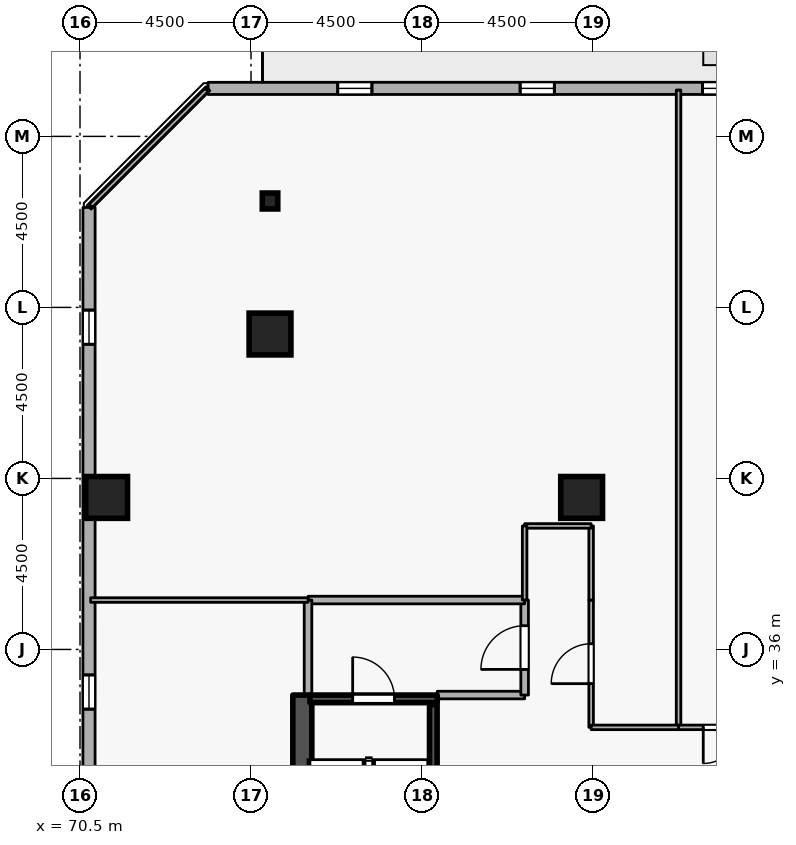
"""IFC4 building model, lengths in metres.
Left out: names, types, materials, properties, quantities, classifications, styles, units other than length and angle.
Written with IfcOpenShell. Run it as: python <this file> out.ifc"""

import sys

from ifc_helpers import new_model, si_unit, direction, frame, frame_2d, origin, origin_2d, place, context, subcontext, project, spatial, rectangle, i_section, extrude, element, fill, save


model = new_model("IFC4")
c1 = context("Model", 3, precision=1e-05, world=origin(), true_north=direction((0.0, 1.0)))
c2 = subcontext(c1, "Body", "Model", "MODEL_VIEW")
j1 = project(units=[si_unit("LENGTHUNIT", "METRE"), si_unit("PLANEANGLEUNIT", "RADIAN")], contexts=[c1])
p1 = place(None, origin())
s1 = spatial("IfcSite", under=j1, at=p1, CompositionType="ELEMENT")
p2 = place(p1, origin())
s2 = spatial("IfcBuilding", under=s1, at=p2, CompositionType="ELEMENT")
p3 = place(p2, frame((0.0, 0.0, 163.5)))
s3 = spatial("IfcBuildingStorey", under=s2, at=p3, CompositionType="ELEMENT", Elevation=163.5)
p4 = place(p3, frame((76.35, 19.2, 0.0), z_axis=(0.0, 0.0, 1.0), x_axis=(0.0, 1.0, 0.0)))
e1 = element("IfcWall", 1, at=p4, inside=s3, PredefinedType="SHEAR", context=c2, shape_type="SweptSolid", body=[
    extrude(rectangle(XDim=15.6, YDim=0.5, at=frame_2d((7.8, 0.0))), origin(), (0.0, 0.0, 1.0), 3.6),
])
for number, where, z_axis, x_axis in (
    (2, (75.5, 44.3, 0.0), (0.0, 0.0, 1.0), (1.0, 0.0, 0.0)),
    (3, (71.2, 40.0, 0.0), (0.0, 0.0, 1.0), (1.0, 0.0, 0.0)),
    (4, (83.7, 40.0, 0.0), (0.0, 0.0, 1.0), (1.0, 0.0, 0.0)),
):
    element("IfcColumn", number, at=place(p3, frame(where, z_axis=z_axis, x_axis=x_axis)), inside=s3, PredefinedType="COLUMN", context=c2, shape_type="SweptSolid", body=[
        extrude(rectangle(XDim=1.1, YDim=1.1, at=origin_2d()), origin(), (0.0, 0.0, 1.0), 3.6),
    ])
p5 = place(p3, frame((75.5, 47.8, 0.0), z_axis=(0.0, 0.0, 1.0), x_axis=(1.0, 0.0, 0.0)))
e5 = element("IfcColumn", 5, at=p5, inside=s3, PredefinedType="COLUMN", context=c2, shape_type="SweptSolid", body=[
    extrude(i_section(OverallWidth=0.407, OverallDepth=0.419, WebThickness=0.031, FlangeThickness=0.049, FilletRadius=0.015, at=origin_2d()), origin(), (0.0, 0.0, 1.0), 3.6),
])
p6 = place(p3, frame((109.681, 50.765, 0.0), z_axis=(0.0, 0.0, 1.0), x_axis=(-0.999999998513, -5.4540124e-05, 0.0)))
e6 = element("IfcWall", 6, at=p6, inside=s3, PredefinedType="STANDARD", context=c2, shape_type="SweptSolid", body=[
    extrude(rectangle(XDim=35.811, YDim=0.32, at=frame_2d((17.905, 0.0))), origin(), (0.0, 0.0, 1.0), 2.7),
])
p7 = place(p6, frame((18.355, 0.0, 0.0)))
e7 = element("IfcOpeningElement", 7, at=p7, cuts=e6, PredefinedType="OPENING", context=c2, shape_type="SweptSolid", body=[
    extrude(rectangle(XDim=1.0, YDim=2.08, at=frame_2d((0.5, 1.04))), frame((0.0, 0.17, 0.0), z_axis=(0.0, -1.0, 0.0), x_axis=(1.0, 0.0, 0.0)), (0.0, 0.0, 1.0), 0.34),
])
p8 = place(p6, frame((2.7, 0.0, 0.72)))
e8 = element("IfcOpeningElement", 8, at=p8, cuts=e6, PredefinedType="OPENING", context=c2, shape_type="SweptSolid", body=[
    extrude(rectangle(XDim=0.9, YDim=1.75, at=frame_2d((0.45, 0.875))), frame((0.0, 0.17, 0.0), z_axis=(0.0, -1.0, 0.0), x_axis=(1.0, 0.0, 0.0)), (0.0, 0.0, 1.0), 0.34),
])
p9 = place(p6, frame((7.5, 0.0, 0.72)))
e9 = element("IfcOpeningElement", 9, at=p9, cuts=e6, PredefinedType="OPENING", context=c2, shape_type="SweptSolid", body=[
    extrude(rectangle(XDim=0.9, YDim=1.75, at=frame_2d((0.45, 0.875))), frame((0.0, 0.17, 0.0), z_axis=(0.0, -1.0, 0.0), x_axis=(1.0, 0.0, 0.0)), (0.0, 0.0, 1.0), 0.34),
])
p10 = place(p6, frame((12.3, 0.0, 0.72)))
e10 = element("IfcOpeningElement", 10, at=p10, cuts=e6, PredefinedType="OPENING", context=c2, shape_type="SweptSolid", body=[
    extrude(rectangle(XDim=0.9, YDim=1.75, at=frame_2d((0.45, 0.875))), frame((0.0, 0.17, 0.0), z_axis=(0.0, -1.0, 0.0), x_axis=(1.0, 0.0, 0.0)), (0.0, 0.0, 1.0), 0.34),
])
p11 = place(p6, frame((21.9, 0.0, 0.72)))
e11 = element("IfcOpeningElement", 11, at=p11, cuts=e6, PredefinedType="OPENING", context=c2, shape_type="SweptSolid", body=[
    extrude(rectangle(XDim=0.9, YDim=1.75, at=frame_2d((0.45, 0.875))), frame((0.0, 0.17, 0.0), z_axis=(0.0, -1.0, 0.0), x_axis=(1.0, 0.0, 0.0)), (0.0, 0.0, 1.0), 0.34),
])
p12 = place(p6, frame((26.7, 0.0, 0.72)))
e12 = element("IfcOpeningElement", 12, at=p12, cuts=e6, PredefinedType="OPENING", context=c2, shape_type="SweptSolid", body=[
    extrude(rectangle(XDim=0.9, YDim=1.75, at=frame_2d((0.45, 0.875))), frame((0.0, 0.17, 0.0), z_axis=(0.0, -1.0, 0.0), x_axis=(1.0, 0.0, 0.0)), (0.0, 0.0, 1.0), 0.34),
])
p13 = place(p6, frame((31.5, 0.0, 0.72)))
e13 = element("IfcOpeningElement", 13, at=p13, cuts=e6, PredefinedType="OPENING", context=c2, shape_type="SweptSolid", body=[
    extrude(rectangle(XDim=0.9, YDim=1.75, at=frame_2d((0.45, 0.875))), frame((0.0, 0.17, 0.0), z_axis=(0.0, -1.0, 0.0), x_axis=(1.0, 0.0, 0.0)), (0.0, 0.0, 1.0), 0.34),
])
p14 = place(p3, frame((70.737, 47.629, 0.0), z_axis=(0.0, 0.0, 1.0), x_axis=(-5.4540124e-05, -0.999999998513, 0.0)))
e14 = element("IfcWall", 14, at=p14, inside=s3, PredefinedType="STANDARD", context=c2, shape_type="SweptSolid", body=[
    extrude(rectangle(XDim=35.811, YDim=0.32, at=frame_2d((17.905, 0.0))), origin(), (0.0, 0.0, 1.0), 2.7),
])
p15 = place(p14, frame((2.7, 0.0, 0.72)))
e15 = element("IfcOpeningElement", 15, at=p15, cuts=e14, PredefinedType="OPENING", context=c2, shape_type="SweptSolid", body=[
    extrude(rectangle(XDim=0.9, YDim=1.75, at=frame_2d((0.45, 0.875))), frame((0.0, 0.17, 0.0), z_axis=(0.0, -1.0, 0.0), x_axis=(1.0, 0.0, 0.0)), (0.0, 0.0, 1.0), 0.34),
])
p16 = place(p14, frame((12.3, 0.0, 0.72)))
e16 = element("IfcOpeningElement", 16, at=p16, cuts=e14, PredefinedType="OPENING", context=c2, shape_type="SweptSolid", body=[
    extrude(rectangle(XDim=0.9, YDim=1.75, at=frame_2d((0.45, 0.875))), frame((0.0, 0.17, 0.0), z_axis=(0.0, -1.0, 0.0), x_axis=(1.0, 0.0, 0.0)), (0.0, 0.0, 1.0), 0.34),
])
p17 = place(p14, frame((17.1, 0.0, 0.72)))
e17 = element("IfcOpeningElement", 17, at=p17, cuts=e14, PredefinedType="OPENING", context=c2, shape_type="SweptSolid", body=[
    extrude(rectangle(XDim=0.9, YDim=1.75, at=frame_2d((0.45, 0.875))), frame((0.0, 0.17, 0.0), z_axis=(0.0, -1.0, 0.0), x_axis=(1.0, 0.0, 0.0)), (0.0, 0.0, 1.0), 0.34),
])
p18 = place(p14, frame((21.9, 0.0, 0.72)))
e18 = element("IfcOpeningElement", 18, at=p18, cuts=e14, PredefinedType="OPENING", context=c2, shape_type="SweptSolid", body=[
    extrude(rectangle(XDim=0.9, YDim=1.75, at=frame_2d((0.45, 0.875))), frame((0.0, 0.17, 0.0), z_axis=(0.0, -1.0, 0.0), x_axis=(1.0, 0.0, 0.0)), (0.0, 0.0, 1.0), 0.34),
])
p19 = place(p14, frame((26.7, 0.0, 0.72)))
e19 = element("IfcOpeningElement", 19, at=p19, cuts=e14, PredefinedType="OPENING", context=c2, shape_type="SweptSolid", body=[
    extrude(rectangle(XDim=0.9, YDim=1.75, at=frame_2d((0.45, 0.875))), frame((0.0, 0.17, 0.0), z_axis=(0.0, -1.0, 0.0), x_axis=(1.0, 0.0, 0.0)), (0.0, 0.0, 1.0), 0.34),
])
p20 = place(p14, frame((31.5, 0.0, 0.72)))
e20 = element("IfcOpeningElement", 20, at=p20, cuts=e14, PredefinedType="OPENING", context=c2, shape_type="SweptSolid", body=[
    extrude(rectangle(XDim=0.9, YDim=1.75, at=frame_2d((0.45, 0.875))), frame((0.0, 0.17, 0.0), z_axis=(0.0, -1.0, 0.0), x_axis=(1.0, 0.0, 0.0)), (0.0, 0.0, 1.0), 0.34),
])
p21 = place(p3, frame((76.55, 34.7, 0.0), z_axis=(0.0, 0.0, 1.0), x_axis=(1.0, 0.0, 0.0)))
e21 = element("IfcWall", 21, at=p21, inside=s3, PredefinedType="SHEAR", context=c2, shape_type="SweptSolid", body=[
    extrude(rectangle(XDim=3.35, YDim=0.2, at=frame_2d((1.675, 0.0))), origin(), (0.0, 0.0, 1.0), 3.6),
])
p22 = place(p21, frame((1.125, 0.0, 0.0)))
e22 = element("IfcOpeningElement", 22, at=p22, cuts=e21, PredefinedType="OPENING", context=c2, shape_type="SweptSolid", body=[
    extrude(rectangle(XDim=1.1, YDim=2.1, at=frame_2d((0.55, 1.05))), frame((0.0, 0.11, 0.0), z_axis=(0.0, -1.0, 0.0), x_axis=(1.0, 0.0, 0.0)), (0.0, 0.0, 1.0), 0.22),
])
p23 = place(p3, frame((79.797, 27.45, 0.0), z_axis=(0.0, 0.0, 1.0), x_axis=(0.0, 1.0, 0.0)))
e23 = element("IfcWall", 23, at=p23, inside=s3, PredefinedType="SHEAR", context=c2, shape_type="SweptSolid", body=[
    extrude(rectangle(XDim=7.1, YDim=0.2, at=frame_2d((3.55, 0.0))), origin(), (0.0, 0.0, 1.0), 3.6),
])
p24 = place(p3, frame((79.9, 34.8, 0.0), z_axis=(0.0, 0.0, 1.0), x_axis=(1.0, 0.0, 0.0)))
e24 = element("IfcWall", 24, at=p24, inside=s3, PredefinedType="STANDARD", context=c2, shape_type="SweptSolid", body=[
    extrude(rectangle(XDim=2.3, YDim=0.2, at=frame_2d((1.15, 0.0))), origin(), (0.0, 0.0, 1.0), 2.545),
])
p25 = place(p3, frame((82.2, 34.8, 0.0), z_axis=(0.0, 0.0, 1.0), x_axis=(0.0, 1.0, 0.0)))
e25 = element("IfcWall", 25, at=p25, inside=s3, PredefinedType="STANDARD", context=c2, shape_type="SweptSolid", body=[
    extrude(rectangle(XDim=2.5, YDim=0.2, at=frame_2d((1.25, 0.0))), origin(), (0.0, 0.0, 1.0), 3.34),
])
p26 = place(p25, frame((0.675, 0.0, 0.0)))
e26 = element("IfcOpeningElement", 26, at=p26, cuts=e25, PredefinedType="OPENING", context=c2, shape_type="SweptSolid", body=[
    extrude(rectangle(XDim=1.15, YDim=2.1, at=frame_2d((0.575, 1.05))), frame((0.0, 0.11, 0.0), z_axis=(0.0, -1.0, 0.0), x_axis=(1.0, 0.0, 0.0)), (0.0, 0.0, 1.0), 0.22),
])
p27 = place(p3, frame((82.2, 37.3, 0.0), z_axis=(0.0, 0.0, 1.0), x_axis=(-1.0, 0.0, 0.0)))
e27 = element("IfcWall", 27, at=p27, inside=s3, PredefinedType="STANDARD", context=c2, shape_type="SweptSolid", body=[
    extrude(rectangle(XDim=5.7, YDim=0.2, at=frame_2d((2.85, 0.0))), origin(), (0.0, 0.0, 1.0), 3.34),
])
p28 = place(p3, frame((76.5, 37.3, 0.0), z_axis=(0.0, 0.0, 1.0), x_axis=(0.0, -1.0, 0.0)))
e28 = element("IfcWall", 28, at=p28, inside=s3, PredefinedType="STANDARD", context=c2, shape_type="SweptSolid", body=[
    extrude(rectangle(XDim=2.5, YDim=0.2, at=frame_2d((1.25, 0.0))), origin(), (0.0, 0.0, 1.0), 3.34),
])
p29 = place(p3, frame((86.25, 33.95, 0.0), z_axis=(0.0, 0.0, 1.0), x_axis=(0.0, 1.0, 0.0)))
e29 = element("IfcWall", 29, at=p29, inside=s3, PredefinedType="PARTITIONING", context=c2, shape_type="SweptSolid", body=[
    extrude(rectangle(XDim=16.77, YDim=0.12, at=frame_2d((8.385, 0.0))), origin(), (0.0, 0.0, 1.0), 3.34),
])
p30 = place(p3, frame((88.5, 33.95, 0.0), z_axis=(0.0, 0.0, 1.0), x_axis=(-1.0, 0.0, 0.0)))
e30 = element("IfcWall", 30, at=p30, inside=s3, PredefinedType="PARTITIONING", context=c2, shape_type="SweptSolid", body=[
    extrude(rectangle(XDim=2.25, YDim=0.12, at=frame_2d((1.125, 0.0))), origin(), (0.0, 0.0, 1.0), 3.34),
])
p31 = place(p30, frame((0.65, 0.0, 0.0)))
e31 = element("IfcOpeningElement", 31, at=p31, cuts=e30, PredefinedType="OPENING", context=c2, shape_type="SweptSolid", body=[
    extrude(rectangle(XDim=0.95, YDim=2.1, at=frame_2d((0.475, 1.05))), frame((0.0, 0.07, 0.0), z_axis=(0.0, -1.0, 0.0), x_axis=(1.0, 0.0, 0.0)), (0.0, 0.0, 1.0), 0.14),
])
p32 = place(p3, frame((83.95, 33.95, 0.0), z_axis=(0.0, 0.0, 1.0), x_axis=(0.0, 1.0, 0.0)))
e32 = element("IfcWall", 32, at=p32, inside=s3, PredefinedType="PARTITIONING", context=c2, shape_type="SweptSolid", body=[
    extrude(rectangle(XDim=3.35, YDim=0.12, at=frame_2d((1.675, 0.0))), origin(), (0.0, 0.0, 1.0), 3.34),
])
p33 = place(p32, frame((1.15, 0.0, 0.0)))
e33 = element("IfcOpeningElement", 33, at=p33, cuts=e32, PredefinedType="OPENING", context=c2, shape_type="SweptSolid", body=[
    extrude(rectangle(XDim=1.05, YDim=2.1, at=frame_2d((0.525, 1.05))), frame((0.0, 0.07, 0.0), z_axis=(0.0, -1.0, 0.0), x_axis=(1.0, 0.0, 0.0)), (0.0, 0.0, 1.0), 0.14),
])
p34 = place(p3, frame((83.95, 37.3, 0.0), z_axis=(0.0, 0.0, 1.0), x_axis=(0.0, 1.0, 0.0)))
e34 = element("IfcWall", 34, at=p34, inside=s3, PredefinedType="PARTITIONING", context=c2, shape_type="SweptSolid", body=[
    extrude(rectangle(XDim=1.95, YDim=0.12, at=frame_2d((0.975, 0.0))), origin(), (0.0, 0.0, 1.0), 3.34),
])
p35 = place(p3, frame((83.95, 39.25, 0.0), z_axis=(0.0, 0.0, 1.0), x_axis=(-1.0, 0.0, 0.0)))
e35 = element("IfcWall", 35, at=p35, inside=s3, PredefinedType="PARTITIONING", context=c2, shape_type="SweptSolid", body=[
    extrude(rectangle(XDim=1.75, YDim=0.12, at=frame_2d((0.875, 0.0))), origin(), (0.0, 0.0, 1.0), 3.34),
])
p36 = place(p3, frame((82.2, 39.25, 0.0), z_axis=(0.0, 0.0, 1.0), x_axis=(0.0, -1.0, 0.0)))
e36 = element("IfcWall", 36, at=p36, inside=s3, PredefinedType="PARTITIONING", context=c2, shape_type="SweptSolid", body=[
    extrude(rectangle(XDim=1.95, YDim=0.12, at=frame_2d((0.975, 0.0))), origin(), (0.0, 0.0, 1.0), 3.34),
])
p37 = place(p3, frame((76.5, 37.3, 0.0), z_axis=(0.0, 0.0, 1.0), x_axis=(-1.0, 0.0, 0.0)))
e37 = element("IfcWall", 37, at=p37, inside=s3, PredefinedType="PARTITIONING", context=c2, shape_type="SweptSolid", body=[
    extrude(rectangle(XDim=5.72, YDim=0.12, at=frame_2d((2.86, 0.0))), origin(), (0.0, 0.0, 1.0), 3.34),
])
p38 = place(p3, frame((70.78, 47.671, 0.0), z_axis=(0.0, 0.0, 1.0), x_axis=(0.707106781187, 0.707106781187, 0.0)))
e38 = element("IfcWall", 38, at=p38, inside=s3, PredefinedType="PARTITIONING", context=c2, shape_type="SweptSolid", body=[
    extrude(rectangle(XDim=4.311, YDim=0.12, at=frame_2d((2.156, 0.0))), origin(), (0.0, 0.0, 1.0), 3.34),
])
p39 = place(p3, frame((86.25, 33.95, 0.0), z_axis=(0.0, 0.0, 1.0), x_axis=(-1.0, 0.0, 0.0)))
e39 = element("IfcWall", 39, at=p39, inside=s3, PredefinedType="PARTITIONING", context=c2, shape_type="SweptSolid", body=[
    extrude(rectangle(XDim=2.3, YDim=0.12, at=frame_2d((1.15, 0.0))), origin(), (0.0, 0.0, 1.0), 3.34),
])
p40 = place(p11, origin())
e40 = element("IfcWindow", 40, at=p40, inside=s3, PartitioningType="SINGLE_PANEL", PredefinedType="WINDOW", context=c2, shape_type="SweptSolid", body=[
    extrude(rectangle(XDim=0.9, YDim=1.75, at=frame_2d((0.45, 0.875))), frame((0.0, 0.03, 0.0), z_axis=(0.0, -1.0, 0.0), x_axis=(1.0, 0.0, 0.0)), (0.0, 0.0, 1.0), 0.06),
])
fill(e11, e40)
p41 = place(p12, origin())
e41 = element("IfcWindow", 41, at=p41, inside=s3, PartitioningType="SINGLE_PANEL", PredefinedType="WINDOW", context=c2, shape_type="SweptSolid", body=[
    extrude(rectangle(XDim=0.9, YDim=1.75, at=frame_2d((0.45, 0.875))), frame((0.0, 0.03, 0.0), z_axis=(0.0, -1.0, 0.0), x_axis=(1.0, 0.0, 0.0)), (0.0, 0.0, 1.0), 0.06),
])
fill(e12, e41)
p42 = place(p13, origin())
e42 = element("IfcWindow", 42, at=p42, inside=s3, PartitioningType="SINGLE_PANEL", PredefinedType="WINDOW", context=c2, shape_type="SweptSolid", body=[
    extrude(rectangle(XDim=0.9, YDim=1.75, at=frame_2d((0.45, 0.875))), frame((0.0, 0.03, 0.0), z_axis=(0.0, -1.0, 0.0), x_axis=(1.0, 0.0, 0.0)), (0.0, 0.0, 1.0), 0.06),
])
fill(e13, e42)
p43 = place(p15, origin())
e43 = element("IfcWindow", 43, at=p43, inside=s3, PartitioningType="SINGLE_PANEL", PredefinedType="WINDOW", context=c2, shape_type="SweptSolid", body=[
    extrude(rectangle(XDim=0.9, YDim=1.75, at=frame_2d((0.45, 0.875))), frame((0.0, 0.03, 0.0), z_axis=(0.0, -1.0, 0.0), x_axis=(1.0, 0.0, 0.0)), (0.0, 0.0, 1.0), 0.06),
])
fill(e15, e43)
p44 = place(p16, origin())
e44 = element("IfcWindow", 44, at=p44, inside=s3, PartitioningType="SINGLE_PANEL", PredefinedType="WINDOW", context=c2, shape_type="SweptSolid", body=[
    extrude(rectangle(XDim=0.9, YDim=1.75, at=frame_2d((0.45, 0.875))), frame((0.0, 0.03, 0.0), z_axis=(0.0, -1.0, 0.0), x_axis=(1.0, 0.0, 0.0)), (0.0, 0.0, 1.0), 0.06),
])
fill(e16, e44)
p45 = place(p22, origin())
e45 = element("IfcDoor", 45, at=p45, inside=s3, OperationType="SINGLE_SWING_LEFT", PredefinedType="DOOR", context=c2, shape_type="SweptSolid", body=[
    extrude(rectangle(XDim=1.1, YDim=2.1, at=frame_2d((0.55, 1.05))), frame((0.0, 0.025, 0.0), z_axis=(0.0, -1.0, 0.0), x_axis=(1.0, 0.0, 0.0)), (0.0, 0.0, 1.0), 0.05),
])
fill(e22, e45)
p46 = place(p26, origin())
e46 = element("IfcDoor", 46, at=p46, inside=s3, OperationType="SINGLE_SWING_LEFT", PredefinedType="DOOR", context=c2, shape_type="SweptSolid", body=[
    extrude(rectangle(XDim=1.15, YDim=2.1, at=frame_2d((0.575, 1.05))), frame((0.0, 0.025, 0.0), z_axis=(0.0, -1.0, 0.0), x_axis=(1.0, 0.0, 0.0)), (0.0, 0.0, 1.0), 0.05),
])
fill(e26, e46)
p47 = place(p31, origin())
e47 = element("IfcDoor", 47, at=p47, inside=s3, OperationType="SINGLE_SWING_RIGHT", PredefinedType="DOOR", context=c2, shape_type="SweptSolid", body=[
    extrude(rectangle(XDim=0.95, YDim=2.1, at=frame_2d((0.475, 1.05))), frame((0.0, 0.025, 0.0), z_axis=(0.0, -1.0, 0.0), x_axis=(1.0, 0.0, 0.0)), (0.0, 0.0, 1.0), 0.05),
])
fill(e31, e47)
p48 = place(p33, origin())
e48 = element("IfcDoor", 48, at=p48, inside=s3, OperationType="SINGLE_SWING_LEFT", PredefinedType="DOOR", context=c2, shape_type="SweptSolid", body=[
    extrude(rectangle(XDim=1.05, YDim=2.1, at=frame_2d((0.525, 1.05))), frame((0.0, 0.025, 0.0), z_axis=(0.0, -1.0, 0.0), x_axis=(1.0, 0.0, 0.0)), (0.0, 0.0, 1.0), 0.05),
])
fill(e33, e48)
save(model, sys.argv[1])
